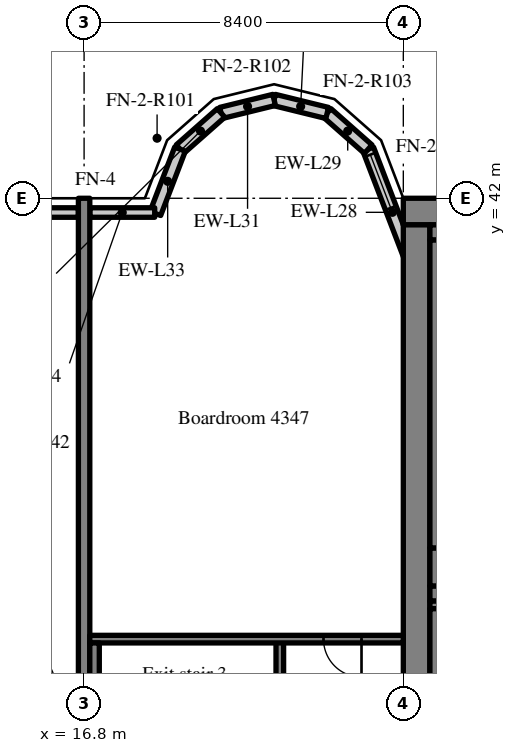
"""IFC4 building model, lengths in metres.
Left out: names, types, materials, properties, quantities, classifications, styles, units other than length and angle.
Written with IfcOpenShell. Run it as: python <this file> out.ifc"""

import sys

from ifc_helpers import new_model, si_unit, direction, frame, frame_2d, origin, place, context, subcontext, project, spatial, rectangle, extrude, source, transform, mapped, element, fill, save


model = new_model("IFC4")
c1 = context("Model", 3, precision=1e-05, world=origin(), true_north=direction((0.0, 1.0)))
c2 = subcontext(c1, "Body", "Model", "MODEL_VIEW")
j1 = project(units=[si_unit("LENGTHUNIT", "METRE"), si_unit("PLANEANGLEUNIT", "RADIAN")], contexts=[c1])
p1 = place(None, origin())
s1 = spatial("IfcSite", under=j1, at=p1, CompositionType="ELEMENT")
p2 = place(p1, origin())
s2 = spatial("IfcBuilding", under=s1, at=p2, CompositionType="ELEMENT")
p3 = place(p2, frame((0.0, 0.0, 178.2)))
s3 = spatial("IfcBuildingStorey", under=s2, at=p3, CompositionType="ELEMENT", Elevation=178.2)
m1 = source(origin(), c2, "Body", "SweptSolid", [
    extrude(rectangle(XDim=50.4, YDim=0.7, at=frame_2d((25.2, 0.0))), origin(), (0.0, 0.0, 1.0), 3.52),
])
p4 = place(p3, frame((25.2, 41.65, 0.0), z_axis=(0.0, 0.0, 1.0), x_axis=(1.0, 0.0, 0.0)))
e1 = element("IfcWall", 1, at=p4, inside=s3, PredefinedType="SHEAR", context=c2, shape_type="MappedRepresentation", body=[
    mapped(m1, transform((0.0, 0.0, 0.0), scale=1.0)),
])
m2 = source(origin(), c2, "Body", "SweptSolid", [
    extrude(rectangle(XDim=18.6, YDim=0.7, at=frame_2d((9.3, 0.0))), origin(), (0.0, 0.0, 1.0), 3.52),
])
p5 = place(p3, frame((25.55, 22.7, 0.0), z_axis=(0.0, 0.0, 1.0), x_axis=(0.0, 1.0, 0.0)))
e2 = element("IfcWall", 2, at=p5, inside=s3, PredefinedType="SHEAR", context=c2, shape_type="MappedRepresentation", body=[
    mapped(m2, transform((0.0, 0.0, 0.0), scale=1.0)),
])
m3 = source(origin(), c2, "Body", "SweptSolid", [
    extrude(rectangle(XDim=7.5, YDim=0.4, at=frame_2d((3.75, 0.0))), origin(), (0.0, 0.0, 1.0), 3.52),
])
p6 = place(p3, frame((25.9, 31.6, 0.0), z_axis=(0.0, 0.0, 1.0), x_axis=(1.0, 0.0, 0.0)))
e3 = element("IfcWall", 3, at=p6, inside=s3, PredefinedType="SHEAR", context=c2, shape_type="MappedRepresentation", body=[
    mapped(m3, transform((0.0, 0.0, 0.0), scale=1.0)),
])
m4 = source(origin(), c2, "Body", "SweptSolid", [
    extrude(rectangle(XDim=1.1, YDim=2.1, at=frame_2d((0.55, 1.05))), frame((0.0, 0.21, 0.0), z_axis=(0.0, -1.0, 0.0), x_axis=(1.0, 0.0, 0.0)), (0.0, 0.0, 1.0), 0.42),
])
p7 = place(p6, frame((5.825, 0.0, 0.0)))
e4 = element("IfcOpeningElement", 4, at=p7, cuts=e3, PredefinedType="OPENING", context=c2, shape_type="MappedRepresentation", body=[
    mapped(m4, transform((0.0, 0.0, 0.0), scale=1.0)),
])
m5 = source(origin(), c2, "Body", "SweptSolid", [
    extrude(rectangle(XDim=20.0, YDim=0.3, at=frame_2d((10.0, 0.0))), origin(), (0.0, 0.0, 1.0), 3.52),
])
p8 = place(p3, frame((16.8, 22.0, 0.0), z_axis=(0.0, 0.0, 1.0), x_axis=(0.0, 1.0, 0.0)))
e5 = element("IfcWall", 5, at=p8, inside=s3, PredefinedType="SHEAR", context=c2, shape_type="MappedRepresentation", body=[
    mapped(m5, transform((0.0, 0.0, 0.0), scale=1.0)),
])
m6 = source(origin(), c2, "Body", "SweptSolid", [
    extrude(rectangle(XDim=3.559, YDim=0.3, at=frame_2d((1.78, 0.0))), origin(), (0.0, 0.0, 1.0), 3.52),
])
p9 = place(p3, frame((25.55, 39.969, 0.0), z_axis=(0.0, 0.0, 1.0), x_axis=(-0.35779745313, 0.933799219604, 0.0)))
e6 = element("IfcWall", 6, at=p9, inside=s3, PredefinedType="SOLIDWALL", context=c2, shape_type="MappedRepresentation", body=[
    mapped(m6, transform((0.0, 0.0, 0.0), scale=1.0)),
])
m7 = source(origin(), c2, "Body", "SweptSolid", [
    extrude(rectangle(XDim=1.5, YDim=2.0, at=frame_2d((0.75, 1.0))), frame((0.0, 0.16, 0.0), z_axis=(0.0, -1.0, 0.0), x_axis=(1.0, 0.0, 0.0)), (0.0, 0.0, 1.0), 0.32),
])
p10 = place(p9, frame((1.903, 0.0, 0.9)))
e7 = element("IfcOpeningElement", 7, at=p10, cuts=e6, PredefinedType="OPENING", context=c2, shape_type="MappedRepresentation", body=[
    mapped(m7, transform((0.0, 0.0, 0.0), scale=1.0)),
])
m8 = source(origin(), c2, "Body", "SweptSolid", [
    extrude(rectangle(XDim=1.44, YDim=0.3, at=frame_2d((0.72, 0.0))), origin(), (0.0, 0.0, 1.0), 3.52),
])
p11 = place(p3, frame((24.277, 43.292, 0.0), z_axis=(0.0, 0.0, 1.0), x_axis=(-0.749649827867, 0.661834673902, 0.0)))
e8 = element("IfcWall", 8, at=p11, inside=s3, PredefinedType="SOLIDWALL", context=c2, shape_type="MappedRepresentation", body=[
    mapped(m8, transform((0.0, 0.0, 0.0), scale=1.0)),
])
m9 = source(origin(), c2, "Body", "SweptSolid", [
    extrude(rectangle(XDim=1.438, YDim=0.3, at=frame_2d((0.719, 0.0))), origin(), (0.0, 0.0, 1.0), 3.52),
])
p12 = place(p3, frame((23.197, 44.245, 0.0), z_axis=(0.0, 0.0, 1.0), x_axis=(-0.971152283879, 0.238460146601, 0.0)))
e9 = element("IfcWall", 9, at=p12, inside=s3, PredefinedType="SOLIDWALL", context=c2, shape_type="MappedRepresentation", body=[
    mapped(m9, transform((0.0, 0.0, 0.0), scale=1.0)),
])
m10 = source(origin(), c2, "Body", "SweptSolid", [
    extrude(rectangle(XDim=1.439, YDim=0.3, at=frame_2d((0.719, 0.0))), origin(), (0.0, 0.0, 1.0), 3.52),
])
p13 = place(p3, frame((21.8, 44.588, 0.0), z_axis=(0.0, 0.0, 1.0), x_axis=(-0.971161932466, -0.238420848351, 0.0)))
e10 = element("IfcWall", 10, at=p13, inside=s3, PredefinedType="SOLIDWALL", context=c2, shape_type="MappedRepresentation", body=[
    mapped(m10, transform((0.0, 0.0, 0.0), scale=1.0)),
])
m11 = source(origin(), c2, "Body", "SweptSolid", [
    extrude(rectangle(XDim=1.44, YDim=0.3, at=frame_2d((0.72, 0.0))), origin(), (0.0, 0.0, 1.0), 3.52),
])
p14 = place(p3, frame((20.403, 44.245, 0.0), z_axis=(0.0, 0.0, 1.0), x_axis=(-0.74957555648, -0.661918790432, 0.0)))
e11 = element("IfcWall", 11, at=p14, inside=s3, PredefinedType="SOLIDWALL", context=c2, shape_type="MappedRepresentation", body=[
    mapped(m11, transform((0.0, 0.0, 0.0), scale=1.0)),
])
m12 = source(origin(), c2, "Body", "SweptSolid", [
    extrude(rectangle(XDim=1.812, YDim=0.3, at=frame_2d((0.906, 0.0))), origin(), (0.0, 0.0, 1.0), 3.52),
])
p15 = place(p3, frame((19.323, 43.292, 0.0), z_axis=(0.0, 0.0, 1.0), x_axis=(-0.357877270961, -0.93376863244, 0.0)))
e12 = element("IfcWall", 12, at=p15, inside=s3, PredefinedType="SOLIDWALL", context=c2, shape_type="MappedRepresentation", body=[
    mapped(m12, transform((0.0, 0.0, 0.0), scale=1.0)),
])
m13 = source(origin(), c2, "Body", "SweptSolid", [
    extrude(rectangle(XDim=4.094, YDim=0.25, at=frame_2d((2.047, 0.0))), origin(), (0.0, 0.0, 1.0), 2.87),
])
p16 = place(p3, frame((16.65, 41.625, 0.0), z_axis=(0.0, 0.0, 1.0), x_axis=(-1.0, 0.0, 0.0)))
e13 = element("IfcWall", 13, at=p16, inside=s3, PredefinedType="SOLIDWALL", context=c2, shape_type="MappedRepresentation", body=[
    mapped(m13, transform((0.0, 0.0, 0.0), scale=1.0)),
])
m14 = source(origin(), c2, "Body", "SweptSolid", [
    extrude(rectangle(XDim=1.5, YDim=1.5, at=frame_2d((0.75, 0.75))), frame((0.0, 0.135, 0.0), z_axis=(0.0, -1.0, 0.0), x_axis=(1.0, 0.0, 0.0)), (0.0, 0.0, 1.0), 0.27),
])
p17 = place(p16, frame((1.297, 0.0, 0.9)))
e14 = element("IfcOpeningElement", 14, at=p17, cuts=e13, PredefinedType="OPENING", context=c2, shape_type="MappedRepresentation", body=[
    mapped(m14, transform((0.0, 0.0, 0.0), scale=1.0)),
])
m15 = source(origin(), c2, "Body", "SweptSolid", [
    extrude(rectangle(XDim=1.708, YDim=0.25, at=frame_2d((0.854, 0.0))), origin(), (0.0, 0.0, 1.0), 2.87),
])
p18 = place(p3, frame((18.658, 41.625, 0.0), z_axis=(0.0, 0.0, 1.0), x_axis=(-1.0, 0.0, 0.0)))
e15 = element("IfcWall", 15, at=p18, inside=s3, PredefinedType="SOLIDWALL", context=c2, shape_type="MappedRepresentation", body=[
    mapped(m15, transform((0.0, 0.0, 0.0), scale=1.0)),
])
m16 = source(origin(), c2, "Body", "SweptSolid", [
    extrude(rectangle(XDim=8.3, YDim=0.2, at=frame_2d((4.15, 0.0))), origin(), (0.0, 0.0, 1.0), 3.52),
])
p19 = place(p3, frame((21.95, 22.1, 0.0), z_axis=(0.0, 0.0, 1.0), x_axis=(0.0, 1.0, 0.0)))
e16 = element("IfcWall", 16, at=p19, inside=s3, PredefinedType="SOLIDWALL", context=c2, shape_type="MappedRepresentation", body=[
    mapped(m16, transform((0.0, 0.0, 0.0), scale=1.0)),
])
m17 = source(origin(), c2, "Body", "SweptSolid", [
    extrude(rectangle(XDim=1.2, YDim=2.1, at=frame_2d((0.6, 1.05))), frame((0.0, 0.11, 0.0), z_axis=(0.0, -1.0, 0.0), x_axis=(1.0, 0.0, 0.0)), (0.0, 0.0, 1.0), 0.22),
])
p20 = place(p19, frame((0.6, 0.0, 0.0)))
e17 = element("IfcOpeningElement", 17, at=p20, cuts=e16, PredefinedType="OPENING", context=c2, shape_type="MappedRepresentation", body=[
    mapped(m17, transform((0.0, 0.0, 0.0), scale=1.0)),
])
m18 = source(origin(), c2, "Body", "SweptSolid", [
    extrude(rectangle(XDim=8.25, YDim=0.2, at=frame_2d((4.125, 0.0))), origin(), (0.0, 0.0, 1.0), 3.52),
])
p21 = place(p3, frame((16.95, 30.4, 0.0), z_axis=(0.0, 0.0, 1.0), x_axis=(1.0, 0.0, 0.0)))
e18 = element("IfcWall", 18, at=p21, inside=s3, PredefinedType="SOLIDWALL", context=c2, shape_type="MappedRepresentation", body=[
    mapped(m18, transform((0.0, 0.0, 0.0), scale=1.0)),
])
m19 = source(origin(), c2, "Body", "SweptSolid", [
    extrude(rectangle(XDim=1.0, YDim=2.1, at=frame_2d((0.5, 1.05))), frame((0.0, 0.11, 0.0), z_axis=(0.0, -1.0, 0.0), x_axis=(1.0, 0.0, 0.0)), (0.0, 0.0, 1.0), 0.22),
])
p22 = place(p21, frame((6.15, 0.0, 0.0)))
e19 = element("IfcOpeningElement", 19, at=p22, cuts=e18, PredefinedType="OPENING", context=c2, shape_type="MappedRepresentation", body=[
    mapped(m19, transform((0.0, 0.0, 0.0), scale=1.0)),
])
m20 = source(origin(), c2, "Body", "SweptSolid", [
    extrude(rectangle(XDim=5.05, YDim=0.2, at=frame_2d((2.525, 0.0))), origin(), (0.0, 0.0, 1.0), 3.52),
])
p23 = place(p3, frame((25.9, 31.3, 0.0), z_axis=(0.0, 0.0, 1.0), x_axis=(1.0, 0.0, 0.0)))
e20 = element("IfcWall", 20, at=p23, inside=s3, PredefinedType="SOLIDWALL", context=c2, shape_type="MappedRepresentation", body=[
    mapped(m20, transform((0.0, 0.0, 0.0), scale=1.0)),
])
m21 = source(origin(), c2, "Body", "SweptSolid", [
    extrude(rectangle(XDim=8.1, YDim=0.4, at=frame_2d((4.05, 0.0))), origin(), (0.0, 0.0, 1.0), 3.52),
])
p24 = place(p3, frame((26.1, 23.1, 0.0), z_axis=(0.0, 0.0, 1.0), x_axis=(0.0, 1.0, 0.0)))
e21 = element("IfcWall", 21, at=p24, inside=s3, PredefinedType="SOLIDWALL", context=c2, shape_type="MappedRepresentation", body=[
    mapped(m21, transform((0.0, 0.0, 0.0), scale=1.0)),
])
m22 = source(origin(), c2, "Body", "SweptSolid", [
    extrude(rectangle(XDim=8.1, YDim=0.25, at=frame_2d((4.05, 0.0))), origin(), (0.0, 0.0, 1.0), 3.52),
])
p25 = place(p3, frame((17.075, 22.2, 0.0), z_axis=(0.0, 0.0, 1.0), x_axis=(0.0, 1.0, 0.0)))
e22 = element("IfcWall", 22, at=p25, inside=s3, PredefinedType="SOLIDWALL", context=c2, shape_type="MappedRepresentation", body=[
    mapped(m22, transform((0.0, 0.0, 0.0), scale=1.0)),
])
m23 = source(origin(), c2, "Body", "SweptSolid", [
    extrude(rectangle(XDim=5.05, YDim=0.4, at=frame_2d((2.525, 0.0))), origin(), (0.0, 0.0, 1.0), 3.52),
])
p26 = place(p3, frame((25.9, 41.1, 0.0), z_axis=(0.0, 0.0, 1.0), x_axis=(1.0, 0.0, 0.0)))
e23 = element("IfcWall", 23, at=p26, inside=s3, PredefinedType="SOLIDWALL", context=c2, shape_type="MappedRepresentation", body=[
    mapped(m23, transform((0.0, 0.0, 0.0), scale=1.0)),
])
m24 = source(origin(), c2, "Body", "SweptSolid", [
    extrude(rectangle(XDim=5.05, YDim=1.0, at=frame_2d((2.525, 0.0))), origin(), (0.0, 0.0, 1.0), 3.52),
])
p27 = place(p3, frame((25.9, 32.3, 0.0), z_axis=(0.0, 0.0, 1.0), x_axis=(1.0, 0.0, 0.0)))
e24 = element("IfcWall", 24, at=p27, inside=s3, PredefinedType="SOLIDWALL", context=c2, shape_type="MappedRepresentation", body=[
    mapped(m24, transform((0.0, 0.0, 0.0), scale=1.0)),
])
p28 = place(p3, frame((26.1, 32.8, 0.0), z_axis=(0.0, 0.0, 1.0), x_axis=(0.0, 1.0, 0.0)))
e25 = element("IfcWall", 25, at=p28, inside=s3, PredefinedType="SOLIDWALL", context=c2, shape_type="MappedRepresentation", body=[
    mapped(m21, transform((0.0, 0.0, 0.0), scale=1.0)),
])
m25 = source(origin(), c2, "Body", "SweptSolid", [
    extrude(rectangle(XDim=1.5, YDim=2.0, at=frame_2d((0.75, 1.0))), frame((0.0, 0.03, 0.0), z_axis=(0.0, -1.0, 0.0), x_axis=(1.0, 0.0, 0.0)), (0.0, 0.0, 1.0), 0.06),
])
p29 = place(p10, origin())
e26 = element("IfcWindow", 26, at=p29, inside=s3, PartitioningType="SINGLE_PANEL", PredefinedType="WINDOW", context=c2, shape_type="MappedRepresentation", body=[
    mapped(m25, transform((0.0, 0.0, 0.0), scale=1.0)),
])
fill(e7, e26)
m26 = source(origin(), c2, "Body", "SweptSolid", [
    extrude(rectangle(XDim=1.0, YDim=2.1, at=frame_2d((0.5, 1.05))), frame((0.0, 0.025, 0.0), z_axis=(0.0, -1.0, 0.0), x_axis=(1.0, 0.0, 0.0)), (0.0, 0.0, 1.0), 0.05),
])
p30 = place(p22, origin())
e27 = element("IfcDoor", 27, at=p30, inside=s3, OperationType="SINGLE_SWING_RIGHT", PredefinedType="DOOR", context=c2, shape_type="MappedRepresentation", body=[
    mapped(m26, transform((0.0, 0.0, 0.0), scale=1.0)),
])
fill(e19, e27)
save(model, sys.argv[1])
